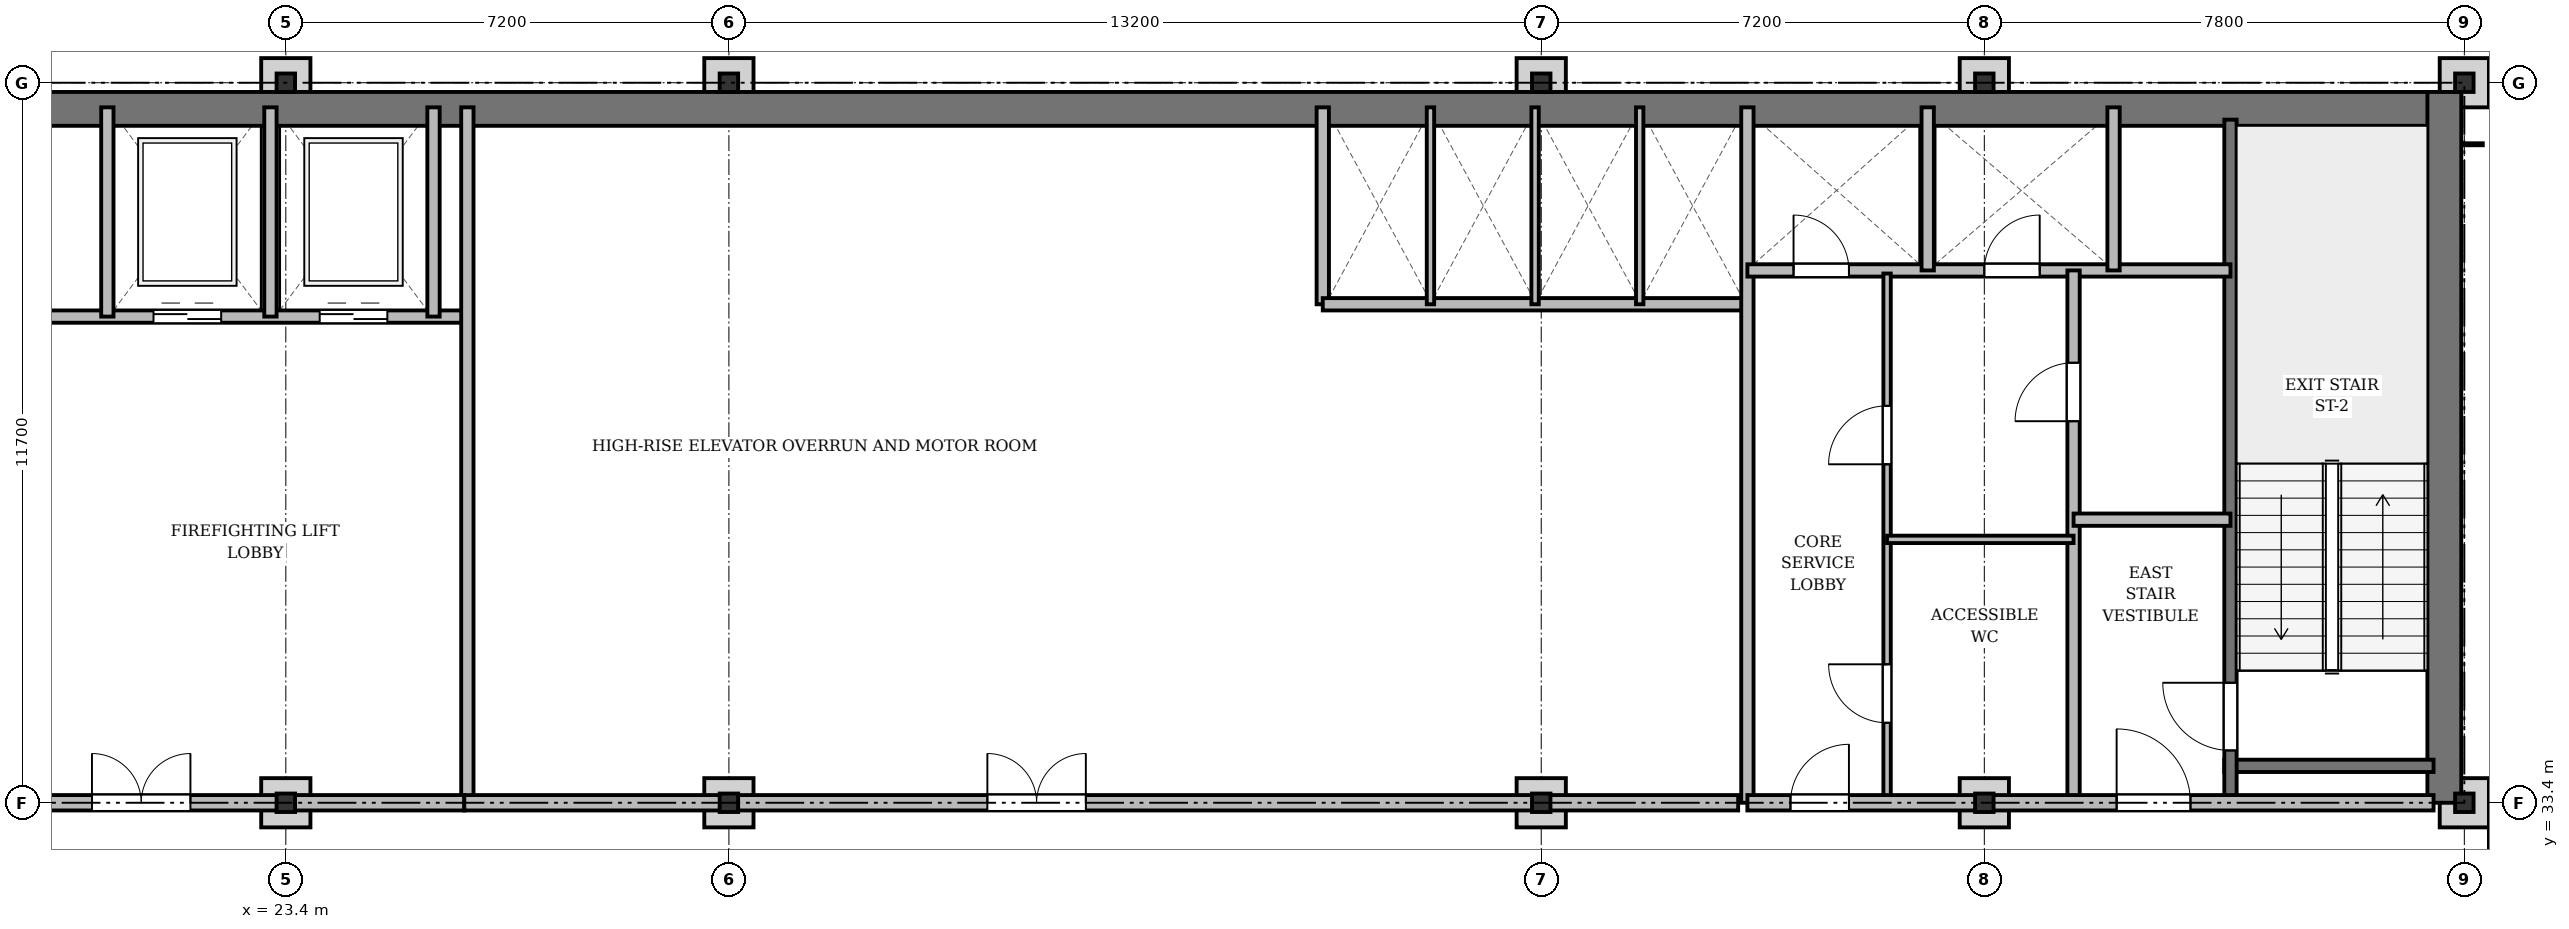
"""IFC4 building model, lengths in metres.
Left out: names, types, materials, properties, quantities, classifications, styles, units other than length and angle.
Written with IfcOpenShell. Run it as: python <this file> out.ifc"""

import sys

from ifc_helpers import new_model, si_unit, direction, frame, frame_2d, origin, origin_2d, place, context, subcontext, project, spatial, rectangle, i_section, extrude, source, transform, mapped, element, fill, save


model = new_model("IFC4")
c1 = context("Model", 3, precision=1e-05, world=origin(), true_north=direction((0.0, 1.0)))
c2 = subcontext(c1, "Body", "Model", "MODEL_VIEW")
j1 = project(units=[si_unit("LENGTHUNIT", "METRE"), si_unit("PLANEANGLEUNIT", "RADIAN")], contexts=[c1])
p1 = place(None, origin())
s1 = spatial("IfcSite", under=j1, at=p1, CompositionType="ELEMENT")
p2 = place(p1, origin())
s2 = spatial("IfcBuilding", under=s1, at=p2, CompositionType="ELEMENT")
p3 = place(p2, frame((0.0, 0.0, 299.1)))
s3 = spatial("IfcBuildingStorey", under=s2, at=p3, CompositionType="ELEMENT", Elevation=299.1)
m1 = source(origin(), c2, "Body", "SweptSolid", [
    extrude(i_section(OverallWidth=0.3, OverallDepth=0.3, WebThickness=0.015, FlangeThickness=0.024, at=origin_2d()), origin(), (0.0, 0.0, 1.0), 4.4),
])
for number, where, z_axis, x_axis in (
    (1, (23.4, 33.4, 0.0), (0.0, 0.0, 1.0), (1.0, 0.0, 0.0)),
    (2, (23.4, 45.1, 0.0), (0.0, 0.0, 1.0), (1.0, 0.0, 0.0)),
    (3, (30.6, 33.4, 0.0), (0.0, 0.0, 1.0), (1.0, 0.0, 0.0)),
    (4, (30.6, 45.1, 0.0), (0.0, 0.0, 1.0), (1.0, 0.0, 0.0)),
    (5, (43.8, 33.4, 0.0), (0.0, 0.0, 1.0), (1.0, 0.0, 0.0)),
    (6, (43.8, 45.1, 0.0), (0.0, 0.0, 1.0), (1.0, 0.0, 0.0)),
    (7, (51.0, 33.4, 0.0), (0.0, 0.0, 1.0), (1.0, 0.0, 0.0)),
    (8, (51.0, 45.1, 0.0), (0.0, 0.0, 1.0), (1.0, 0.0, 0.0)),
    (9, (58.8, 33.4, 0.0), (0.0, 0.0, 1.0), (1.0, 0.0, 0.0)),
    (10, (58.8, 45.1, 0.0), (0.0, 0.0, 1.0), (1.0, 0.0, 0.0)),
):
    element("IfcColumn", number, at=place(p3, frame(where, z_axis=z_axis, x_axis=x_axis)), inside=s3, PredefinedType="COLUMN", context=c2, shape_type="MappedRepresentation", body=[
        mapped(m1, transform((0.0, 0.0, 0.0), x_axis=(1.0, 0.0, 0.0), y_axis=(0.0, 1.0, 0.0), z_axis=(0.0, 0.0, 1.0), scale=1.0)),
    ])
p4 = place(p3, frame((15.65, 44.675, 0.0), z_axis=(0.0, 0.0, 1.0), x_axis=(1.0, 0.0, 0.0)))
e11 = element("IfcWall", 11, at=p4, inside=s3, PredefinedType="SHEAR", context=c2, shape_type="SweptSolid", body=[
    extrude(rectangle(XDim=43.1, YDim=0.55, at=frame_2d((21.55, 0.0))), origin(), (0.0, 0.0, 1.0), 4.12),
])
p5 = place(p3, frame((58.475, 33.4, 0.0), z_axis=(0.0, 0.0, 1.0), x_axis=(0.0, 1.0, 0.0)))
e12 = element("IfcWall", 12, at=p5, inside=s3, PredefinedType="SHEAR", context=c2, shape_type="SweptSolid", body=[
    extrude(rectangle(XDim=11.55, YDim=0.55, at=frame_2d((5.775, 0.0))), origin(), (0.0, 0.0, 1.0), 4.12),
])
p6 = place(p3, frame((54.9, 34.0, 0.0), z_axis=(0.0, 0.0, 1.0), x_axis=(1.0, 0.0, 0.0)))
e13 = element("IfcWall", 13, at=p6, inside=s3, PredefinedType="SHEAR", context=c2, shape_type="SweptSolid", body=[
    extrude(rectangle(XDim=3.4, YDim=0.2, at=frame_2d((1.7, 0.0))), origin(), (0.0, 0.0, 1.0), 4.12),
])
p7 = place(p3, frame((55.0, 33.4, 0.0), z_axis=(0.0, 0.0, 1.0), x_axis=(0.0, 1.0, 0.0)))
e14 = element("IfcWall", 14, at=p7, inside=s3, PredefinedType="SHEAR", context=c2, shape_type="SweptSolid", body=[
    extrude(rectangle(XDim=11.1, YDim=0.2, at=frame_2d((5.55, 0.0))), origin(), (0.0, 0.0, 1.0), 4.12),
])
p8 = place(p7, frame((0.85, 0.0, 0.0)))
e15 = element("IfcOpeningElement", 15, at=p8, cuts=e14, PredefinedType="OPENING", context=c2, shape_type="SweptSolid", body=[
    extrude(rectangle(XDim=1.1, YDim=2.15, at=frame_2d((0.55, 1.075))), frame((0.0, 0.11, 0.0), z_axis=(0.0, -1.0, 0.0), x_axis=(1.0, 0.0, 0.0)), (0.0, 0.0, 1.0), 0.22),
])
p9 = place(p3, frame((19.55, 41.3, 0.0), z_axis=(0.0, 0.0, 1.0), x_axis=(1.0, 0.0, 0.0)))
e16 = element("IfcWall", 16, at=p9, inside=s3, PredefinedType="SOLIDWALL", context=c2, shape_type="SweptSolid", body=[
    extrude(rectangle(XDim=6.75, YDim=0.2, at=frame_2d((3.375, 0.0))), origin(), (0.0, 0.0, 1.0), 4.12),
])
p10 = place(p9, frame((1.7, 0.0, 0.0)))
e17 = element("IfcOpeningElement", 17, at=p10, cuts=e16, PredefinedType="OPENING", context=c2, shape_type="SweptSolid", body=[
    extrude(rectangle(XDim=1.1, YDim=2.15, at=frame_2d((0.55, 1.075))), frame((0.0, 0.11, 0.0), z_axis=(0.0, -1.0, 0.0), x_axis=(1.0, 0.0, 0.0)), (0.0, 0.0, 1.0), 0.22),
])
p11 = place(p9, frame((4.4, 0.0, 0.0)))
e18 = element("IfcOpeningElement", 18, at=p11, cuts=e16, PredefinedType="OPENING", context=c2, shape_type="SweptSolid", body=[
    extrude(rectangle(XDim=1.1, YDim=2.15, at=frame_2d((0.55, 1.075))), frame((0.0, 0.11, 0.0), z_axis=(0.0, -1.0, 0.0), x_axis=(1.0, 0.0, 0.0)), (0.0, 0.0, 1.0), 0.22),
])
for number, where, z_axis, x_axis in (
    (19, (20.5, 41.3, 0.0), (0.0, 0.0, 1.0), (0.0, 1.0, 0.0)),
    (20, (23.15, 41.3, 0.0), (0.0, 0.0, 1.0), (0.0, 1.0, 0.0)),
    (21, (25.8, 41.3, 0.0), (0.0, 0.0, 1.0), (0.0, 1.0, 0.0)),
):
    element("IfcWall", number, at=place(p3, frame(where, z_axis=z_axis, x_axis=x_axis)), inside=s3, PredefinedType="SOLIDWALL", context=c2, shape_type="SweptSolid", body=[
        extrude(rectangle(XDim=3.4, YDim=0.2, at=frame_2d((1.7, 0.0))), origin(), (0.0, 0.0, 1.0), 4.12),
    ])
p12 = place(p3, frame((26.35, 33.4, 0.0), z_axis=(0.0, 0.0, 1.0), x_axis=(0.0, 1.0, 0.0)))
e22 = element("IfcWall", 22, at=p12, inside=s3, PredefinedType="SOLIDWALL", context=c2, shape_type="SweptSolid", body=[
    extrude(rectangle(XDim=11.3, YDim=0.2, at=frame_2d((5.65, 0.0))), origin(), (0.0, 0.0, 1.0), 3.62),
])
p13 = place(p3, frame((19.5, 33.4, 0.0), z_axis=(0.0, 0.0, 1.0), x_axis=(1.0, 0.0, 0.0)))
e23 = element("IfcWall", 23, at=p13, inside=s3, PredefinedType="PARTITIONING", context=c2, shape_type="SweptSolid", body=[
    extrude(rectangle(XDim=6.8, YDim=0.25, at=frame_2d((3.4, 0.0))), origin(), (0.0, 0.0, 1.0), 3.62),
])
p14 = place(p13, frame((0.75, 0.0, 0.0)))
e24 = element("IfcOpeningElement", 24, at=p14, cuts=e23, PredefinedType="OPENING", context=c2, shape_type="SweptSolid", body=[
    extrude(rectangle(XDim=1.6, YDim=2.2, at=frame_2d((0.8, 1.1))), frame((0.0, 0.135, 0.0), z_axis=(0.0, -1.0, 0.0), x_axis=(1.0, 0.0, 0.0)), (0.0, 0.0, 1.0), 0.27),
])
p15 = place(p3, frame((40.25, 41.5, 0.0), z_axis=(0.0, 0.0, 1.0), x_axis=(0.0, 1.0, 0.0)))
e25 = element("IfcWall", 25, at=p15, inside=s3, PredefinedType="SOLIDWALL", context=c2, shape_type="SweptSolid", body=[
    extrude(rectangle(XDim=3.2, YDim=0.2, at=frame_2d((1.6, 0.0))), origin(), (0.0, 0.0, 1.0), 4.12),
])
p16 = place(p3, frame((40.25, 41.5, 0.0), z_axis=(0.0, 0.0, 1.0), x_axis=(1.0, 0.0, 0.0)))
e26 = element("IfcWall", 26, at=p16, inside=s3, PredefinedType="SOLIDWALL", context=c2, shape_type="SweptSolid", body=[
    extrude(rectangle(XDim=6.9, YDim=0.2, at=frame_2d((3.45, 0.0))), origin(), (0.0, 0.0, 1.0), 3.62),
])
p17 = place(p3, frame((47.15, 33.4, 0.0), z_axis=(0.0, 0.0, 1.0), x_axis=(0.0, 1.0, 0.0)))
e27 = element("IfcWall", 27, at=p17, inside=s3, PredefinedType="SOLIDWALL", context=c2, shape_type="SweptSolid", body=[
    extrude(rectangle(XDim=11.3, YDim=0.2, at=frame_2d((5.65, 0.0))), origin(), (0.0, 0.0, 1.0), 3.62),
])
p18 = place(p3, frame((42.0, 41.5, 0.0), z_axis=(0.0, 0.0, 1.0), x_axis=(0.0, 1.0, 0.0)))
e28 = element("IfcWall", 28, at=p18, inside=s3, PredefinedType="PARTITIONING", context=c2, shape_type="SweptSolid", body=[
    extrude(rectangle(XDim=3.2, YDim=0.12, at=frame_2d((1.6, 0.0))), origin(), (0.0, 0.0, 1.0), 4.12),
])
p19 = place(p3, frame((43.7, 41.5, 0.0), z_axis=(0.0, 0.0, 1.0), x_axis=(0.0, 1.0, 0.0)))
e29 = element("IfcWall", 29, at=p19, inside=s3, PredefinedType="PARTITIONING", context=c2, shape_type="SweptSolid", body=[
    extrude(rectangle(XDim=3.2, YDim=0.12, at=frame_2d((1.6, 0.0))), origin(), (0.0, 0.0, 1.0), 3.62),
])
p20 = place(p3, frame((45.4, 41.5, 0.0), z_axis=(0.0, 0.0, 1.0), x_axis=(0.0, 1.0, 0.0)))
e30 = element("IfcWall", 30, at=p20, inside=s3, PredefinedType="PARTITIONING", context=c2, shape_type="SweptSolid", body=[
    extrude(rectangle(XDim=3.2, YDim=0.12, at=frame_2d((1.6, 0.0))), origin(), (0.0, 0.0, 1.0), 4.12),
])
p21 = place(p3, frame((26.3, 33.4, 0.0), z_axis=(0.0, 0.0, 1.0), x_axis=(1.0, 0.0, 0.0)))
e31 = element("IfcWall", 31, at=p21, inside=s3, PredefinedType="PARTITIONING", context=c2, shape_type="SweptSolid", body=[
    extrude(rectangle(XDim=20.7, YDim=0.25, at=frame_2d((10.35, 0.0))), origin(), (0.0, 0.0, 1.0), 3.62),
])
p22 = place(p21, frame((8.5, 0.0, 0.0)))
e32 = element("IfcOpeningElement", 32, at=p22, cuts=e31, PredefinedType="OPENING", context=c2, shape_type="SweptSolid", body=[
    extrude(rectangle(XDim=1.6, YDim=2.2, at=frame_2d((0.8, 1.1))), frame((0.0, 0.135, 0.0), z_axis=(0.0, -1.0, 0.0), x_axis=(1.0, 0.0, 0.0)), (0.0, 0.0, 1.0), 0.27),
])
p23 = place(p3, frame((47.15, 42.05, 0.0), z_axis=(0.0, 0.0, 1.0), x_axis=(1.0, 0.0, 0.0)))
e33 = element("IfcWall", 33, at=p23, inside=s3, PredefinedType="SOLIDWALL", context=c2, shape_type="SweptSolid", body=[
    extrude(rectangle(XDim=7.85, YDim=0.2, at=frame_2d((3.925, 0.0))), origin(), (0.0, 0.0, 1.0), 3.62),
])
p24 = place(p23, frame((0.75, 0.0, 0.0)))
e34 = element("IfcOpeningElement", 34, at=p24, cuts=e33, PredefinedType="OPENING", context=c2, shape_type="SweptSolid", body=[
    extrude(rectangle(XDim=0.9, YDim=2.1, at=frame_2d((0.45, 1.05))), frame((0.0, 0.11, 0.0), z_axis=(0.0, -1.0, 0.0), x_axis=(1.0, 0.0, 0.0)), (0.0, 0.0, 1.0), 0.22),
])
p25 = place(p23, frame((3.85, 0.0, 0.0)))
e35 = element("IfcOpeningElement", 35, at=p25, cuts=e33, PredefinedType="OPENING", context=c2, shape_type="SweptSolid", body=[
    extrude(rectangle(XDim=0.9, YDim=2.1, at=frame_2d((0.45, 1.05))), frame((0.0, 0.11, 0.0), z_axis=(0.0, -1.0, 0.0), x_axis=(1.0, 0.0, 0.0)), (0.0, 0.0, 1.0), 0.22),
])
for number, where, z_axis, x_axis in (
    (36, (50.08, 42.05, 0.0), (0.0, 0.0, 1.0), (0.0, 1.0, 0.0)),
    (37, (53.1, 42.05, 0.0), (0.0, 0.0, 1.0), (0.0, 1.0, 0.0)),
):
    element("IfcWall", number, at=place(p3, frame(where, z_axis=z_axis, x_axis=x_axis)), inside=s3, PredefinedType="SOLIDWALL", context=c2, shape_type="SweptSolid", body=[
        extrude(rectangle(XDim=2.65, YDim=0.2, at=frame_2d((1.325, 0.0))), origin(), (0.0, 0.0, 1.0), 4.12),
    ])
p26 = place(p3, frame((52.45, 33.4, 0.0), z_axis=(0.0, 0.0, 1.0), x_axis=(0.0, 1.0, 0.0)))
e38 = element("IfcWall", 38, at=p26, inside=s3, PredefinedType="PARTITIONING", context=c2, shape_type="SweptSolid", body=[
    extrude(rectangle(XDim=8.65, YDim=0.2, at=frame_2d((4.325, 0.0))), origin(), (0.0, 0.0, 1.0), 3.62),
])
p27 = place(p26, frame((6.2, 0.0, 0.0)))
e39 = element("IfcOpeningElement", 39, at=p27, cuts=e38, PredefinedType="OPENING", context=c2, shape_type="SweptSolid", body=[
    extrude(rectangle(XDim=0.95, YDim=2.15, at=frame_2d((0.475, 1.075))), frame((0.0, 0.11, 0.0), z_axis=(0.0, -1.0, 0.0), x_axis=(1.0, 0.0, 0.0)), (0.0, 0.0, 1.0), 0.22),
])
p28 = place(p3, frame((52.45, 38.0, 0.0), z_axis=(0.0, 0.0, 1.0), x_axis=(1.0, 0.0, 0.0)))
e40 = element("IfcWall", 40, at=p28, inside=s3, PredefinedType="PARTITIONING", context=c2, shape_type="SweptSolid", body=[
    extrude(rectangle(XDim=2.55, YDim=0.2, at=frame_2d((1.275, 0.0))), origin(), (0.0, 0.0, 1.0), 4.12),
])
p29 = place(p3, frame((49.42, 33.4, 0.0), z_axis=(0.0, 0.0, 1.0), x_axis=(0.0, 1.0, 0.0)))
e41 = element("IfcWall", 41, at=p29, inside=s3, PredefinedType="PARTITIONING", context=c2, shape_type="SweptSolid", body=[
    extrude(rectangle(XDim=8.6, YDim=0.12, at=frame_2d((4.3, 0.0))), origin(), (0.0, 0.0, 1.0), 3.62),
])
p30 = place(p29, frame((1.3, 0.0, 0.0)))
e42 = element("IfcOpeningElement", 42, at=p30, cuts=e41, PredefinedType="OPENING", context=c2, shape_type="SweptSolid", body=[
    extrude(rectangle(XDim=0.95, YDim=2.15, at=frame_2d((0.475, 1.075))), frame((0.0, 0.07, 0.0), z_axis=(0.0, -1.0, 0.0), x_axis=(1.0, 0.0, 0.0)), (0.0, 0.0, 1.0), 0.14),
])
p31 = place(p29, frame((5.5, 0.0, 0.0)))
e43 = element("IfcOpeningElement", 43, at=p31, cuts=e41, PredefinedType="OPENING", context=c2, shape_type="SweptSolid", body=[
    extrude(rectangle(XDim=0.95, YDim=2.15, at=frame_2d((0.475, 1.075))), frame((0.0, 0.07, 0.0), z_axis=(0.0, -1.0, 0.0), x_axis=(1.0, 0.0, 0.0)), (0.0, 0.0, 1.0), 0.14),
])
p32 = place(p3, frame((49.42, 37.68, 0.0), z_axis=(0.0, 0.0, 1.0), x_axis=(1.0, 0.0, 0.0)))
e44 = element("IfcWall", 44, at=p32, inside=s3, PredefinedType="PARTITIONING", context=c2, shape_type="SweptSolid", body=[
    extrude(rectangle(XDim=3.03, YDim=0.12, at=frame_2d((1.515, 0.0))), origin(), (0.0, 0.0, 1.0), 3.62),
])
p33 = place(p3, frame((47.15, 33.4, 0.0), z_axis=(0.0, 0.0, 1.0), x_axis=(1.0, 0.0, 0.0)))
e45 = element("IfcWall", 45, at=p33, inside=s3, PredefinedType="PARTITIONING", context=c2, shape_type="SweptSolid", body=[
    extrude(rectangle(XDim=11.15, YDim=0.25, at=frame_2d((5.575, 0.0))), origin(), (0.0, 0.0, 1.0), 3.62),
])
p34 = place(p33, frame((0.7, 0.0, 0.0)))
e46 = element("IfcOpeningElement", 46, at=p34, cuts=e45, PredefinedType="OPENING", context=c2, shape_type="SweptSolid", body=[
    extrude(rectangle(XDim=0.95, YDim=2.15, at=frame_2d((0.475, 1.075))), frame((0.0, 0.135, 0.0), z_axis=(0.0, -1.0, 0.0), x_axis=(1.0, 0.0, 0.0)), (0.0, 0.0, 1.0), 0.27),
])
p35 = place(p33, frame((6.0, 0.0, 0.0)))
e47 = element("IfcOpeningElement", 47, at=p35, cuts=e45, PredefinedType="OPENING", context=c2, shape_type="SweptSolid", body=[
    extrude(rectangle(XDim=1.2, YDim=2.15, at=frame_2d((0.6, 1.075))), frame((0.0, 0.135, 0.0), z_axis=(0.0, -1.0, 0.0), x_axis=(1.0, 0.0, 0.0)), (0.0, 0.0, 1.0), 0.27),
])
m2 = source(origin(), c2, "Body", "SweptSolid", [
    extrude(rectangle(XDim=1.1, YDim=2.15, at=frame_2d((0.55, 1.075))), frame((0.0, 0.025, 0.0), z_axis=(0.0, -1.0, 0.0), x_axis=(1.0, 0.0, 0.0)), (0.0, 0.0, 1.0), 0.05),
])
p36 = place(p8, origin())
e48 = element("IfcDoor", 48, at=p36, inside=s3, OperationType="SINGLE_SWING_RIGHT", PredefinedType="DOOR", context=c2, shape_type="MappedRepresentation", body=[
    mapped(m2, transform((0.0, 0.0, 0.0), x_axis=(1.0, 0.0, 0.0), y_axis=(0.0, 1.0, 0.0), z_axis=(0.0, 0.0, 1.0), scale=1.0)),
])
fill(e15, e48)
p37 = place(p10, origin())
e49 = element("IfcDoor", 49, at=p37, inside=s3, OperationType="DOUBLE_DOOR_SLIDING", PredefinedType="DOOR", context=c2, shape_type="MappedRepresentation", body=[
    mapped(m2, transform((0.0, 0.0, 0.0), x_axis=(1.0, 0.0, 0.0), y_axis=(0.0, 1.0, 0.0), z_axis=(0.0, 0.0, 1.0), scale=1.0)),
])
fill(e17, e49)
p38 = place(p11, origin())
e50 = element("IfcDoor", 50, at=p38, inside=s3, OperationType="DOUBLE_DOOR_SLIDING", PredefinedType="DOOR", context=c2, shape_type="MappedRepresentation", body=[
    mapped(m2, transform((0.0, 0.0, 0.0), x_axis=(1.0, 0.0, 0.0), y_axis=(0.0, 1.0, 0.0), z_axis=(0.0, 0.0, 1.0), scale=1.0)),
])
fill(e18, e50)
m3 = source(origin(), c2, "Body", "SweptSolid", [
    extrude(rectangle(XDim=1.6, YDim=2.2, at=frame_2d((0.8, 1.1))), frame((0.0, 0.025, 0.0), z_axis=(0.0, -1.0, 0.0), x_axis=(1.0, 0.0, 0.0)), (0.0, 0.0, 1.0), 0.05),
])
p39 = place(p14, origin())
e51 = element("IfcDoor", 51, at=p39, inside=s3, OperationType="DOUBLE_DOOR_SINGLE_SWING", PredefinedType="DOOR", context=c2, shape_type="MappedRepresentation", body=[
    mapped(m3, transform((0.0, 0.0, 0.0), x_axis=(1.0, 0.0, 0.0), y_axis=(0.0, 1.0, 0.0), z_axis=(0.0, 0.0, 1.0), scale=1.0)),
])
fill(e24, e51)
p40 = place(p22, origin())
e52 = element("IfcDoor", 52, at=p40, inside=s3, OperationType="DOUBLE_DOOR_SINGLE_SWING", PredefinedType="DOOR", context=c2, shape_type="MappedRepresentation", body=[
    mapped(m3, transform((0.0, 0.0, 0.0), x_axis=(1.0, 0.0, 0.0), y_axis=(0.0, 1.0, 0.0), z_axis=(0.0, 0.0, 1.0), scale=1.0)),
])
fill(e32, e52)
m4 = source(origin(), c2, "Body", "SweptSolid", [
    extrude(rectangle(XDim=0.9, YDim=2.1, at=frame_2d((0.45, 1.05))), frame((0.0, 0.025, 0.0), z_axis=(0.0, -1.0, 0.0), x_axis=(1.0, 0.0, 0.0)), (0.0, 0.0, 1.0), 0.05),
])
p41 = place(p24, origin())
e53 = element("IfcDoor", 53, at=p41, inside=s3, OperationType="SINGLE_SWING_LEFT", PredefinedType="DOOR", context=c2, shape_type="MappedRepresentation", body=[
    mapped(m4, transform((0.0, 0.0, 0.0), x_axis=(1.0, 0.0, 0.0), y_axis=(0.0, 1.0, 0.0), z_axis=(0.0, 0.0, 1.0), scale=1.0)),
])
fill(e34, e53)
p42 = place(p25, origin())
e54 = element("IfcDoor", 54, at=p42, inside=s3, OperationType="SINGLE_SWING_RIGHT", PredefinedType="DOOR", context=c2, shape_type="MappedRepresentation", body=[
    mapped(m4, transform((0.0, 0.0, 0.0), x_axis=(1.0, 0.0, 0.0), y_axis=(0.0, 1.0, 0.0), z_axis=(0.0, 0.0, 1.0), scale=1.0)),
])
fill(e35, e54)
m5 = source(origin(), c2, "Body", "SweptSolid", [
    extrude(rectangle(XDim=0.95, YDim=2.15, at=frame_2d((0.475, 1.075))), frame((0.0, 0.025, 0.0), z_axis=(0.0, -1.0, 0.0), x_axis=(1.0, 0.0, 0.0)), (0.0, 0.0, 1.0), 0.05),
])
p43 = place(p27, origin())
e55 = element("IfcDoor", 55, at=p43, inside=s3, OperationType="SINGLE_SWING_LEFT", PredefinedType="DOOR", context=c2, shape_type="MappedRepresentation", body=[
    mapped(m5, transform((0.0, 0.0, 0.0), x_axis=(1.0, 0.0, 0.0), y_axis=(0.0, 1.0, 0.0), z_axis=(0.0, 0.0, 1.0), scale=1.0)),
])
fill(e39, e55)
p44 = place(p30, origin())
e56 = element("IfcDoor", 56, at=p44, inside=s3, OperationType="SINGLE_SWING_RIGHT", PredefinedType="DOOR", context=c2, shape_type="MappedRepresentation", body=[
    mapped(m5, transform((0.0, 0.0, 0.0), x_axis=(1.0, 0.0, 0.0), y_axis=(0.0, 1.0, 0.0), z_axis=(0.0, 0.0, 1.0), scale=1.0)),
])
fill(e42, e56)
p45 = place(p31, origin())
e57 = element("IfcDoor", 57, at=p45, inside=s3, OperationType="SINGLE_SWING_LEFT", PredefinedType="DOOR", context=c2, shape_type="MappedRepresentation", body=[
    mapped(m5, transform((0.0, 0.0, 0.0), x_axis=(1.0, 0.0, 0.0), y_axis=(0.0, 1.0, 0.0), z_axis=(0.0, 0.0, 1.0), scale=1.0)),
])
fill(e43, e57)
p46 = place(p34, origin())
e58 = element("IfcDoor", 58, at=p46, inside=s3, OperationType="SINGLE_SWING_RIGHT", PredefinedType="DOOR", context=c2, shape_type="MappedRepresentation", body=[
    mapped(m5, transform((0.0, 0.0, 0.0), x_axis=(1.0, 0.0, 0.0), y_axis=(0.0, 1.0, 0.0), z_axis=(0.0, 0.0, 1.0), scale=1.0)),
])
fill(e46, e58)
m6 = source(origin(), c2, "Body", "SweptSolid", [
    extrude(rectangle(XDim=1.2, YDim=2.15, at=frame_2d((0.6, 1.075))), frame((0.0, 0.025, 0.0), z_axis=(0.0, -1.0, 0.0), x_axis=(1.0, 0.0, 0.0)), (0.0, 0.0, 1.0), 0.05),
])
p47 = place(p35, origin())
e59 = element("IfcDoor", 59, at=p47, inside=s3, OperationType="SINGLE_SWING_LEFT", PredefinedType="DOOR", context=c2, shape_type="MappedRepresentation", body=[
    mapped(m6, transform((0.0, 0.0, 0.0), x_axis=(1.0, 0.0, 0.0), y_axis=(0.0, 1.0, 0.0), z_axis=(0.0, 0.0, 1.0), scale=1.0)),
])
fill(e47, e59)
save(model, sys.argv[1])
